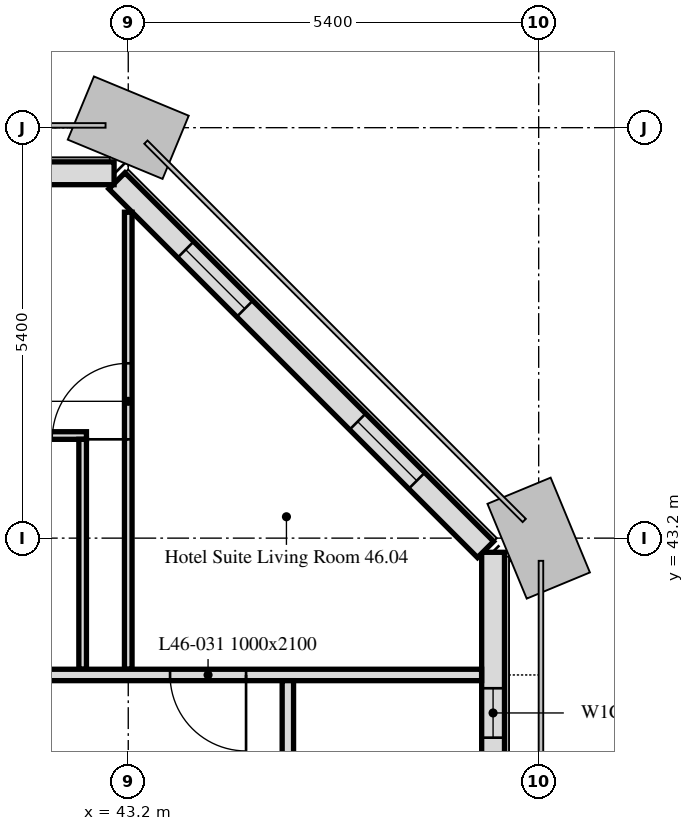
"""IFC4 building model, lengths in metres.
Left out: names, types, materials, properties, quantities, classifications, styles, units other than length and angle.
Written with IfcOpenShell. Run it as: python <this file> out.ifc"""

import sys

from ifc_helpers import new_model, si_unit, direction, frame, frame_2d, origin, place, context, subcontext, project, spatial, rectangle, extrude, element, fill, save


model = new_model("IFC4")
c1 = context("Model", 3, precision=1e-05, world=origin(), true_north=direction((0.0, 1.0)))
c2 = subcontext(c1, "Body", "Model", "MODEL_VIEW")
j1 = project(units=[si_unit("LENGTHUNIT", "METRE"), si_unit("PLANEANGLEUNIT", "RADIAN")], contexts=[c1])
p1 = place(None, origin())
s1 = spatial("IfcSite", under=j1, at=p1, CompositionType="ELEMENT")
p2 = place(p1, origin())
s2 = spatial("IfcBuilding", under=s1, at=p2, CompositionType="ELEMENT")
p3 = place(p2, frame((0.0, 0.0, 190.6)))
s3 = spatial("IfcBuildingStorey", under=s2, at=p3, CompositionType="ELEMENT", Elevation=190.6)
p4 = place(p3, frame((48.0, 10.986, 0.0), z_axis=(0.0, 0.0, 1.0), x_axis=(0.0, 1.0, 0.0)))
e1 = element("IfcWall", 1, at=p4, inside=s3, PredefinedType="SOLIDWALL", context=c2, shape_type="SweptSolid", body=[
    extrude(rectangle(XDim=32.027, YDim=0.3, at=frame_2d((16.014, 0.0))), origin(), (0.0, 0.0, 1.0), 3.0),
])
p5 = place(p4, frame((1.164, 0.0, 0.9)))
e2 = element("IfcOpeningElement", 2, at=p5, cuts=e1, PredefinedType="OPENING", context=c2, shape_type="SweptSolid", body=[
    extrude(rectangle(XDim=1.1, YDim=1.7, at=frame_2d((0.55, 0.85))), frame((0.0, 0.16, 0.0), z_axis=(0.0, -1.0, 0.0), x_axis=(1.0, 0.0, 0.0)), (0.0, 0.0, 1.0), 0.32),
])
p6 = place(p4, frame((2.764, 0.0, 0.9)))
e3 = element("IfcOpeningElement", 3, at=p6, cuts=e1, PredefinedType="OPENING", context=c2, shape_type="SweptSolid", body=[
    extrude(rectangle(XDim=1.1, YDim=1.7, at=frame_2d((0.55, 0.85))), frame((0.0, 0.16, 0.0), z_axis=(0.0, -1.0, 0.0), x_axis=(1.0, 0.0, 0.0)), (0.0, 0.0, 1.0), 0.32),
])
p7 = place(p4, frame((6.214, 0.0, 0.9)))
e4 = element("IfcOpeningElement", 4, at=p7, cuts=e1, PredefinedType="OPENING", context=c2, shape_type="SweptSolid", body=[
    extrude(rectangle(XDim=3.4, YDim=1.7, at=frame_2d((1.7, 0.85))), frame((0.0, 0.16, 0.0), z_axis=(0.0, -1.0, 0.0), x_axis=(1.0, 0.0, 0.0)), (0.0, 0.0, 1.0), 0.32),
])
p8 = place(p4, frame((11.964, 0.0, 0.9)))
e5 = element("IfcOpeningElement", 5, at=p8, cuts=e1, PredefinedType="OPENING", context=c2, shape_type="SweptSolid", body=[
    extrude(rectangle(XDim=1.1, YDim=1.7, at=frame_2d((0.55, 0.85))), frame((0.0, 0.16, 0.0), z_axis=(0.0, -1.0, 0.0), x_axis=(1.0, 0.0, 0.0)), (0.0, 0.0, 1.0), 0.32),
])
p9 = place(p4, frame((13.564, 0.0, 0.9)))
e6 = element("IfcOpeningElement", 6, at=p9, cuts=e1, PredefinedType="OPENING", context=c2, shape_type="SweptSolid", body=[
    extrude(rectangle(XDim=1.1, YDim=1.7, at=frame_2d((0.55, 0.85))), frame((0.0, 0.16, 0.0), z_axis=(0.0, -1.0, 0.0), x_axis=(1.0, 0.0, 0.0)), (0.0, 0.0, 1.0), 0.32),
])
p10 = place(p4, frame((17.014, 0.0, 0.9)))
e7 = element("IfcOpeningElement", 7, at=p10, cuts=e1, PredefinedType="OPENING", context=c2, shape_type="SweptSolid", body=[
    extrude(rectangle(XDim=3.4, YDim=1.7, at=frame_2d((1.7, 0.85))), frame((0.0, 0.16, 0.0), z_axis=(0.0, -1.0, 0.0), x_axis=(1.0, 0.0, 0.0)), (0.0, 0.0, 1.0), 0.32),
])
p11 = place(p4, frame((22.764, 0.0, 0.9)))
e8 = element("IfcOpeningElement", 8, at=p11, cuts=e1, PredefinedType="OPENING", context=c2, shape_type="SweptSolid", body=[
    extrude(rectangle(XDim=1.1, YDim=1.7, at=frame_2d((0.55, 0.85))), frame((0.0, 0.16, 0.0), z_axis=(0.0, -1.0, 0.0), x_axis=(1.0, 0.0, 0.0)), (0.0, 0.0, 1.0), 0.32),
])
p12 = place(p4, frame((24.364, 0.0, 0.9)))
e9 = element("IfcOpeningElement", 9, at=p12, cuts=e1, PredefinedType="OPENING", context=c2, shape_type="SweptSolid", body=[
    extrude(rectangle(XDim=1.1, YDim=1.7, at=frame_2d((0.55, 0.85))), frame((0.0, 0.16, 0.0), z_axis=(0.0, -1.0, 0.0), x_axis=(1.0, 0.0, 0.0)), (0.0, 0.0, 1.0), 0.32),
])
p13 = place(p4, frame((28.164, 0.0, 0.9)))
e10 = element("IfcOpeningElement", 10, at=p13, cuts=e1, PredefinedType="OPENING", context=c2, shape_type="SweptSolid", body=[
    extrude(rectangle(XDim=1.1, YDim=1.7, at=frame_2d((0.55, 0.85))), frame((0.0, 0.16, 0.0), z_axis=(0.0, -1.0, 0.0), x_axis=(1.0, 0.0, 0.0)), (0.0, 0.0, 1.0), 0.32),
])
p14 = place(p4, frame((29.589, 0.0, 0.9)))
e11 = element("IfcOpeningElement", 11, at=p14, cuts=e1, PredefinedType="OPENING", context=c2, shape_type="SweptSolid", body=[
    extrude(rectangle(XDim=0.65, YDim=1.7, at=frame_2d((0.325, 0.85))), frame((0.0, 0.16, 0.0), z_axis=(0.0, -1.0, 0.0), x_axis=(1.0, 0.0, 0.0)), (0.0, 0.0, 1.0), 0.32),
])
p15 = place(p3, frame((47.901, 43.051, 0.0), z_axis=(0.0, 0.0, 1.0), x_axis=(-0.707106781187, 0.707106781187, 0.0)))
e12 = element("IfcWall", 12, at=p15, inside=s3, PredefinedType="SOLIDWALL", context=c2, shape_type="SweptSolid", body=[
    extrude(rectangle(XDim=6.86, YDim=0.3, at=frame_2d((3.43, 0.0))), origin(), (0.0, 0.0, 1.0), 3.0),
])
p16 = place(p15, frame((1.28, 0.0, 0.9)))
e13 = element("IfcOpeningElement", 13, at=p16, cuts=e12, PredefinedType="OPENING", context=c2, shape_type="SweptSolid", body=[
    extrude(rectangle(XDim=1.1, YDim=1.7, at=frame_2d((0.55, 0.85))), frame((0.0, 0.16, 0.0), z_axis=(0.0, -1.0, 0.0), x_axis=(1.0, 0.0, 0.0)), (0.0, 0.0, 1.0), 0.32),
])
p17 = place(p15, frame((4.48, 0.0, 0.9)))
e14 = element("IfcOpeningElement", 14, at=p17, cuts=e12, PredefinedType="OPENING", context=c2, shape_type="SweptSolid", body=[
    extrude(rectangle(XDim=1.1, YDim=1.7, at=frame_2d((0.55, 0.85))), frame((0.0, 0.16, 0.0), z_axis=(0.0, -1.0, 0.0), x_axis=(1.0, 0.0, 0.0)), (0.0, 0.0, 1.0), 0.32),
])
p18 = place(p3, frame((43.014, 48.0, 0.0), z_axis=(0.0, 0.0, 1.0), x_axis=(-1.0, 0.0, 0.0)))
e15 = element("IfcWall", 15, at=p18, inside=s3, PredefinedType="SOLIDWALL", context=c2, shape_type="SweptSolid", body=[
    extrude(rectangle(XDim=32.027, YDim=0.3, at=frame_2d((16.014, 0.0))), origin(), (0.0, 0.0, 1.0), 3.0),
])
p19 = place(p18, frame((2.764, 0.0, 0.9)))
e16 = element("IfcOpeningElement", 16, at=p19, cuts=e15, PredefinedType="OPENING", context=c2, shape_type="SweptSolid", body=[
    extrude(rectangle(XDim=1.1, YDim=1.7, at=frame_2d((0.55, 0.85))), frame((0.0, 0.16, 0.0), z_axis=(0.0, -1.0, 0.0), x_axis=(1.0, 0.0, 0.0)), (0.0, 0.0, 1.0), 0.32),
])
p20 = place(p18, frame((6.214, 0.0, 0.9)))
e17 = element("IfcOpeningElement", 17, at=p20, cuts=e15, PredefinedType="OPENING", context=c2, shape_type="SweptSolid", body=[
    extrude(rectangle(XDim=3.4, YDim=1.7, at=frame_2d((1.7, 0.85))), frame((0.0, 0.16, 0.0), z_axis=(0.0, -1.0, 0.0), x_axis=(1.0, 0.0, 0.0)), (0.0, 0.0, 1.0), 0.32),
])
p21 = place(p18, frame((13.564, 0.0, 0.9)))
e18 = element("IfcOpeningElement", 18, at=p21, cuts=e15, PredefinedType="OPENING", context=c2, shape_type="SweptSolid", body=[
    extrude(rectangle(XDim=1.1, YDim=1.7, at=frame_2d((0.55, 0.85))), frame((0.0, 0.16, 0.0), z_axis=(0.0, -1.0, 0.0), x_axis=(1.0, 0.0, 0.0)), (0.0, 0.0, 1.0), 0.32),
])
p22 = place(p18, frame((17.014, 0.0, 0.9)))
e19 = element("IfcOpeningElement", 19, at=p22, cuts=e15, PredefinedType="OPENING", context=c2, shape_type="SweptSolid", body=[
    extrude(rectangle(XDim=3.4, YDim=1.7, at=frame_2d((1.7, 0.85))), frame((0.0, 0.16, 0.0), z_axis=(0.0, -1.0, 0.0), x_axis=(1.0, 0.0, 0.0)), (0.0, 0.0, 1.0), 0.32),
])
p23 = place(p18, frame((24.364, 0.0, 0.9)))
e20 = element("IfcOpeningElement", 20, at=p23, cuts=e15, PredefinedType="OPENING", context=c2, shape_type="SweptSolid", body=[
    extrude(rectangle(XDim=1.1, YDim=1.7, at=frame_2d((0.55, 0.85))), frame((0.0, 0.16, 0.0), z_axis=(0.0, -1.0, 0.0), x_axis=(1.0, 0.0, 0.0)), (0.0, 0.0, 1.0), 0.32),
])
p24 = place(p18, frame((27.814, 0.0, 0.9)))
e21 = element("IfcOpeningElement", 21, at=p24, cuts=e15, PredefinedType="OPENING", context=c2, shape_type="SweptSolid", body=[
    extrude(rectangle(XDim=3.4, YDim=1.7, at=frame_2d((1.7, 0.85))), frame((0.0, 0.16, 0.0), z_axis=(0.0, -1.0, 0.0), x_axis=(1.0, 0.0, 0.0)), (0.0, 0.0, 1.0), 0.32),
])
p25 = place(p3, frame((40.25, 44.55, 0.0), z_axis=(0.0, 0.0, 1.0), x_axis=(1.0, 0.0, 0.0)))
e22 = element("IfcWall", 22, at=p25, inside=s3, PredefinedType="PARTITIONING", context=c2, shape_type="SweptSolid", body=[
    extrude(rectangle(XDim=2.4, YDim=0.1, at=frame_2d((1.2, 0.0))), origin(), (0.0, 0.0, 1.0), 3.0),
])
p26 = place(p3, frame((42.6, 44.5, 0.0), z_axis=(0.0, 0.0, 1.0), x_axis=(0.0, -1.0, 0.0)))
e23 = element("IfcWall", 23, at=p26, inside=s3, PredefinedType="PARTITIONING", context=c2, shape_type="SweptSolid", body=[
    extrude(rectangle(XDim=3.025, YDim=0.1, at=frame_2d((1.512, 0.0))), origin(), (0.0, 0.0, 1.0), 3.0),
])
p27 = place(p3, frame((43.2, 41.475, 0.0), z_axis=(0.0, 0.0, 1.0), x_axis=(0.0, 1.0, 0.0)))
e24 = element("IfcWall", 24, at=p27, inside=s3, PredefinedType="PARTITIONING", context=c2, shape_type="SweptSolid", body=[
    extrude(rectangle(XDim=6.013, YDim=0.1, at=frame_2d((3.006, 0.0))), origin(), (0.0, 0.0, 1.0), 3.0),
])
p28 = place(p27, frame((3.025, 0.0, 0.0)))
e25 = element("IfcOpeningElement", 25, at=p28, cuts=e24, PredefinedType="OPENING", context=c2, shape_type="SweptSolid", body=[
    extrude(rectangle(XDim=1.0, YDim=2.1, at=frame_2d((0.5, 1.05))), frame((0.0, 0.05, 0.0), z_axis=(0.0, -1.0, 0.0), x_axis=(1.0, 0.0, 0.0)), (0.0, 0.0, 1.0), 0.1),
])
p29 = place(p3, frame((47.849, 41.4, 0.0), z_axis=(0.0, 0.0, 1.0), x_axis=(-1.0, 0.0, 0.0)))
e26 = element("IfcWall", 26, at=p29, inside=s3, PredefinedType="PARTITIONING", context=c2, shape_type="SweptSolid", body=[
    extrude(rectangle(XDim=41.698, YDim=0.15, at=frame_2d((20.849, 0.0))), origin(), (0.0, 0.0, 1.0), 2.4),
])
p30 = place(p29, frame((39.249, 0.0, 0.0)))
e27 = element("IfcOpeningElement", 27, at=p30, cuts=e26, PredefinedType="OPENING", context=c2, shape_type="SweptSolid", body=[
    extrude(rectangle(XDim=1.0, YDim=2.1, at=frame_2d((0.5, 1.05))), frame((0.0, 0.075, 0.0), z_axis=(0.0, -1.0, 0.0), x_axis=(1.0, 0.0, 0.0)), (0.0, 0.0, 1.0), 0.15),
])
p31 = place(p29, frame((11.449, 0.0, 0.0)))
e28 = element("IfcOpeningElement", 28, at=p31, cuts=e26, PredefinedType="OPENING", context=c2, shape_type="SweptSolid", body=[
    extrude(rectangle(XDim=1.0, YDim=2.1, at=frame_2d((0.5, 1.05))), frame((0.0, 0.075, 0.0), z_axis=(0.0, -1.0, 0.0), x_axis=(1.0, 0.0, 0.0)), (0.0, 0.0, 1.0), 0.15),
])
p32 = place(p29, frame((3.099, 0.0, 0.0)))
e29 = element("IfcOpeningElement", 29, at=p32, cuts=e26, PredefinedType="OPENING", context=c2, shape_type="SweptSolid", body=[
    extrude(rectangle(XDim=1.0, YDim=2.1, at=frame_2d((0.5, 1.05))), frame((0.0, 0.075, 0.0), z_axis=(0.0, -1.0, 0.0), x_axis=(1.0, 0.0, 0.0)), (0.0, 0.0, 1.0), 0.15),
])
p33 = place(p29, frame((23.049, 0.0, 0.0)))
e30 = element("IfcOpeningElement", 30, at=p33, cuts=e26, PredefinedType="OPENING", context=c2, shape_type="SweptSolid", body=[
    extrude(rectangle(XDim=1.0, YDim=2.1, at=frame_2d((0.5, 1.05))), frame((0.0, 0.075, 0.0), z_axis=(0.0, -1.0, 0.0), x_axis=(1.0, 0.0, 0.0)), (0.0, 0.0, 1.0), 0.15),
])
p34 = place(p3, frame((45.3, 41.325, 0.0), z_axis=(0.0, 0.0, 1.0), x_axis=(0.0, -1.0, 0.0)))
e31 = element("IfcWall", 31, at=p34, inside=s3, PredefinedType="PARTITIONING", context=c2, shape_type="SweptSolid", body=[
    extrude(rectangle(XDim=29.55, YDim=0.15, at=frame_2d((14.775, 0.0))), origin(), (0.0, 0.0, 1.0), 2.4),
])
p35 = place(p34, frame((5.467, 0.0, 0.0)))
e32 = element("IfcOpeningElement", 32, at=p35, cuts=e31, PredefinedType="OPENING", context=c2, shape_type="SweptSolid", body=[
    extrude(rectangle(XDim=1.0, YDim=2.1, at=frame_2d((0.5, 1.05))), frame((0.0, 0.075, 0.0), z_axis=(0.0, -1.0, 0.0), x_axis=(1.0, 0.0, 0.0)), (0.0, 0.0, 1.0), 0.15),
])
p36 = place(p34, frame((11.125, 0.0, 0.0)))
e33 = element("IfcOpeningElement", 33, at=p36, cuts=e31, PredefinedType="OPENING", context=c2, shape_type="SweptSolid", body=[
    extrude(rectangle(XDim=1.0, YDim=2.1, at=frame_2d((0.5, 1.05))), frame((0.0, 0.075, 0.0), z_axis=(0.0, -1.0, 0.0), x_axis=(1.0, 0.0, 0.0)), (0.0, 0.0, 1.0), 0.15),
])
p37 = place(p34, frame((26.875, 0.0, 0.0)))
e34 = element("IfcOpeningElement", 34, at=p37, cuts=e31, PredefinedType="OPENING", context=c2, shape_type="SweptSolid", body=[
    extrude(rectangle(XDim=1.0, YDim=2.1, at=frame_2d((0.5, 1.05))), frame((0.0, 0.075, 0.0), z_axis=(0.0, -1.0, 0.0), x_axis=(1.0, 0.0, 0.0)), (0.0, 0.0, 1.0), 0.15),
])
p38 = place(p34, frame((20.575, 0.0, 0.0)))
e35 = element("IfcOpeningElement", 35, at=p38, cuts=e31, PredefinedType="OPENING", context=c2, shape_type="SweptSolid", body=[
    extrude(rectangle(XDim=1.0, YDim=2.1, at=frame_2d((0.5, 1.05))), frame((0.0, 0.075, 0.0), z_axis=(0.0, -1.0, 0.0), x_axis=(1.0, 0.0, 0.0)), (0.0, 0.0, 1.0), 0.15),
])
p39 = place(p14, origin())
e36 = element("IfcWindow", 36, at=p39, inside=s3, PartitioningType="SINGLE_PANEL", PredefinedType="WINDOW", context=c2, shape_type="SweptSolid", body=[
    extrude(rectangle(XDim=0.65, YDim=1.7, at=frame_2d((0.325, 0.85))), frame((0.0, 0.03, 0.0), z_axis=(0.0, -1.0, 0.0), x_axis=(1.0, 0.0, 0.0)), (0.0, 0.0, 1.0), 0.06),
])
fill(e11, e36)
p40 = place(p16, origin())
e37 = element("IfcWindow", 37, at=p40, inside=s3, PartitioningType="SINGLE_PANEL", PredefinedType="WINDOW", context=c2, shape_type="SweptSolid", body=[
    extrude(rectangle(XDim=1.1, YDim=1.7, at=frame_2d((0.55, 0.85))), frame((0.0, 0.03, 0.0), z_axis=(0.0, -1.0, 0.0), x_axis=(1.0, 0.0, 0.0)), (0.0, 0.0, 1.0), 0.06),
])
fill(e13, e37)
p41 = place(p17, origin())
e38 = element("IfcWindow", 38, at=p41, inside=s3, PartitioningType="SINGLE_PANEL", PredefinedType="WINDOW", context=c2, shape_type="SweptSolid", body=[
    extrude(rectangle(XDim=1.1, YDim=1.7, at=frame_2d((0.55, 0.85))), frame((0.0, 0.03, 0.0), z_axis=(0.0, -1.0, 0.0), x_axis=(1.0, 0.0, 0.0)), (0.0, 0.0, 1.0), 0.06),
])
fill(e14, e38)
p42 = place(p28, origin())
e39 = element("IfcDoor", 39, at=p42, inside=s3, OperationType="SINGLE_SWING_RIGHT", PredefinedType="DOOR", context=c2, shape_type="SweptSolid", body=[
    extrude(rectangle(XDim=1.0, YDim=2.1, at=frame_2d((0.5, 1.05))), frame((0.0, 0.025, 0.0), z_axis=(0.0, -1.0, 0.0), x_axis=(1.0, 0.0, 0.0)), (0.0, 0.0, 1.0), 0.05),
])
fill(e25, e39)
p43 = place(p32, origin())
e40 = element("IfcDoor", 40, at=p43, inside=s3, OperationType="SINGLE_SWING_RIGHT", PredefinedType="DOOR", context=c2, shape_type="SweptSolid", body=[
    extrude(rectangle(XDim=1.0, YDim=2.1, at=frame_2d((0.5, 1.05))), frame((0.0, 0.025, 0.0), z_axis=(0.0, -1.0, 0.0), x_axis=(1.0, 0.0, 0.0)), (0.0, 0.0, 1.0), 0.05),
])
fill(e29, e40)
save(model, sys.argv[1])
